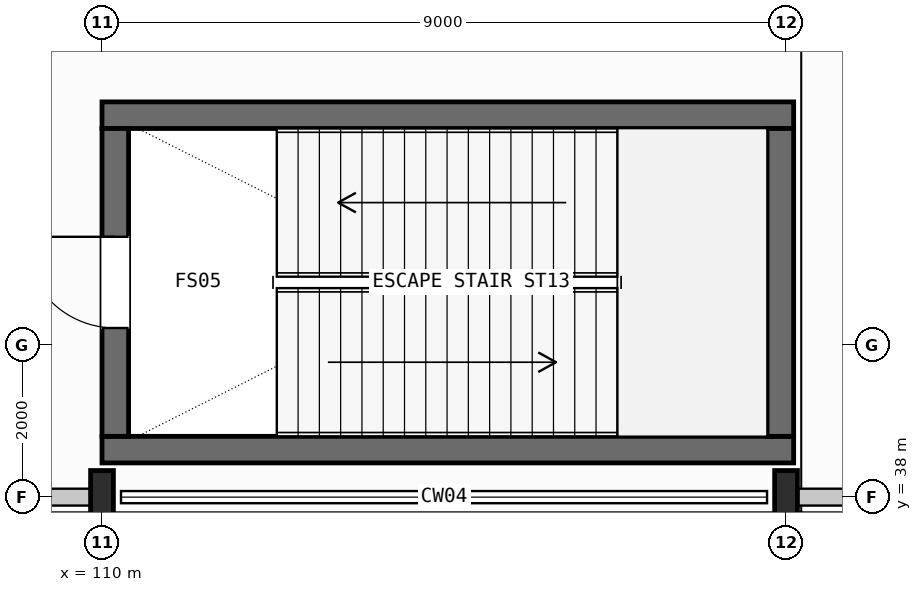
"""IFC4 building model, lengths in metres.
Left out: names, types, materials, properties, quantities, classifications, styles, units other than length and angle.
Written with IfcOpenShell. Run it as: python <this file> out.ifc"""

import sys

from ifc_helpers import new_model, si_unit, direction, frame, frame_2d, origin, origin_2d, place, context, subcontext, project, spatial, rectangle, i_section, extrude, element, fill, save


model = new_model("IFC4")
c1 = context("Model", 3, precision=1e-05, world=origin(), true_north=direction((0.0, 1.0)))
c2 = subcontext(c1, "Body", "Model", "MODEL_VIEW")
j1 = project(units=[si_unit("LENGTHUNIT", "METRE"), si_unit("PLANEANGLEUNIT", "RADIAN")], contexts=[c1])
p1 = place(None, origin())
s1 = spatial("IfcSite", under=j1, at=p1, CompositionType="ELEMENT")
p2 = place(p1, origin())
s2 = spatial("IfcBuilding", under=s1, at=p2, CompositionType="ELEMENT")
p3 = place(p2, origin())
s3 = spatial("IfcBuildingStorey", under=s2, at=p3, CompositionType="ELEMENT", Elevation=0.0)
for number, where, z_axis, x_axis in (
    (1, (110.0, 38.0, 0.0), (0.0, 0.0, 1.0), (1.0, 0.0, 0.0)),
    (2, (119.0, 38.0, 0.0), (0.0, 0.0, 1.0), (1.0, 0.0, 0.0)),
):
    element("IfcColumn", number, at=place(p3, frame(where, z_axis=z_axis, x_axis=x_axis)), inside=s3, PredefinedType="COLUMN", context=c2, shape_type="SweptSolid", body=[
        extrude(i_section(OverallWidth=0.3, OverallDepth=0.7, WebThickness=0.017, FlangeThickness=0.032, FilletRadius=0.027, at=origin_2d()), origin(), (0.0, 0.0, 1.0), 6.0),
    ])
for number, where, z_axis, x_axis in (
    (3, (110.0, 38.625, 0.0), (0.0, 0.0, 1.0), (1.0, 0.0, 0.0)),
    (4, (110.0, 43.025, 0.0), (0.0, 0.0, 1.0), (1.0, 0.0, 0.0)),
):
    element("IfcWall", number, at=place(p3, frame(where, z_axis=z_axis, x_axis=x_axis)), inside=s3, PredefinedType="SHEAR", context=c2, shape_type="SweptSolid", body=[
        extrude(rectangle(XDim=9.1, YDim=0.35, at=frame_2d((4.55, 0.0))), origin(), (0.0, 0.0, 1.0), 6.0),
    ])
p4 = place(p3, frame((110.175, 38.8, 0.0), z_axis=(0.0, 0.0, 1.0), x_axis=(0.0, 1.0, 0.0)))
e5 = element("IfcWall", 5, at=p4, inside=s3, PredefinedType="SHEAR", context=c2, shape_type="SweptSolid", body=[
    extrude(rectangle(XDim=4.05, YDim=0.35, at=frame_2d((2.025, 0.0))), origin(), (0.0, 0.0, 1.0), 6.0),
])
p5 = place(p4, frame((1.425, 0.0, 0.0)))
e6 = element("IfcOpeningElement", 6, at=p5, cuts=e5, PredefinedType="OPENING", context=c2, shape_type="SweptSolid", body=[
    extrude(rectangle(XDim=1.2, YDim=2.2, at=frame_2d((0.6, 1.1))), frame((0.0, 0.185, 0.0), z_axis=(0.0, -1.0, 0.0), x_axis=(1.0, 0.0, 0.0)), (0.0, 0.0, 1.0), 0.37),
])
p6 = place(p3, frame((118.925, 38.8, 0.0), z_axis=(0.0, 0.0, 1.0), x_axis=(0.0, 1.0, 0.0)))
e7 = element("IfcWall", 7, at=p6, inside=s3, PredefinedType="SHEAR", context=c2, shape_type="SweptSolid", body=[
    extrude(rectangle(XDim=4.05, YDim=0.35, at=frame_2d((2.025, 0.0))), origin(), (0.0, 0.0, 1.0), 6.0),
])
p7 = place(p3, frame((101.146, 38.0, 0.0), z_axis=(0.0, 0.0, 1.0), x_axis=(1.0, 0.0, 0.0)))
e8 = element("IfcWall", 8, at=p7, inside=s3, PredefinedType="STANDARD", context=c2, shape_type="SweptSolid", body=[
    extrude(rectangle(XDim=8.708, YDim=0.222, at=frame_2d((4.354, 0.0))), origin(), (0.0, 0.0, 1.0), 5.098),
])
p8 = place(p3, frame((119.146, 38.0, 0.0), z_axis=(0.0, 0.0, 1.0), x_axis=(1.0, 0.0, 0.0)))
e9 = element("IfcWall", 9, at=p8, inside=s3, PredefinedType="STANDARD", context=c2, shape_type="SweptSolid", body=[
    extrude(rectangle(XDim=8.708, YDim=0.222, at=frame_2d((4.354, 0.0))), origin(), (0.0, 0.0, 1.0), 5.098),
])
p9 = place(p8, frame((4.756, 0.0, 0.0)))
e10 = element("IfcOpeningElement", 10, at=p9, cuts=e9, PredefinedType="OPENING", context=c2, shape_type="SweptSolid", body=[
    extrude(rectangle(XDim=2.0, YDim=2.3, at=frame_2d((1.0, 1.15))), frame((0.0, 0.121, 0.0), z_axis=(0.0, -1.0, 0.0), x_axis=(1.0, 0.0, 0.0)), (0.0, 0.0, 1.0), 0.242),
])
p10 = place(p5, origin())
e11 = element("IfcDoor", 11, at=p10, inside=s3, OperationType="SINGLE_SWING_RIGHT", PredefinedType="DOOR", context=c2, shape_type="SweptSolid", body=[
    extrude(rectangle(XDim=1.2, YDim=2.2, at=frame_2d((0.6, 1.1))), frame((0.0, 0.025, 0.0), z_axis=(0.0, -1.0, 0.0), x_axis=(1.0, 0.0, 0.0)), (0.0, 0.0, 1.0), 0.05),
])
fill(e6, e11)
save(model, sys.argv[1])
